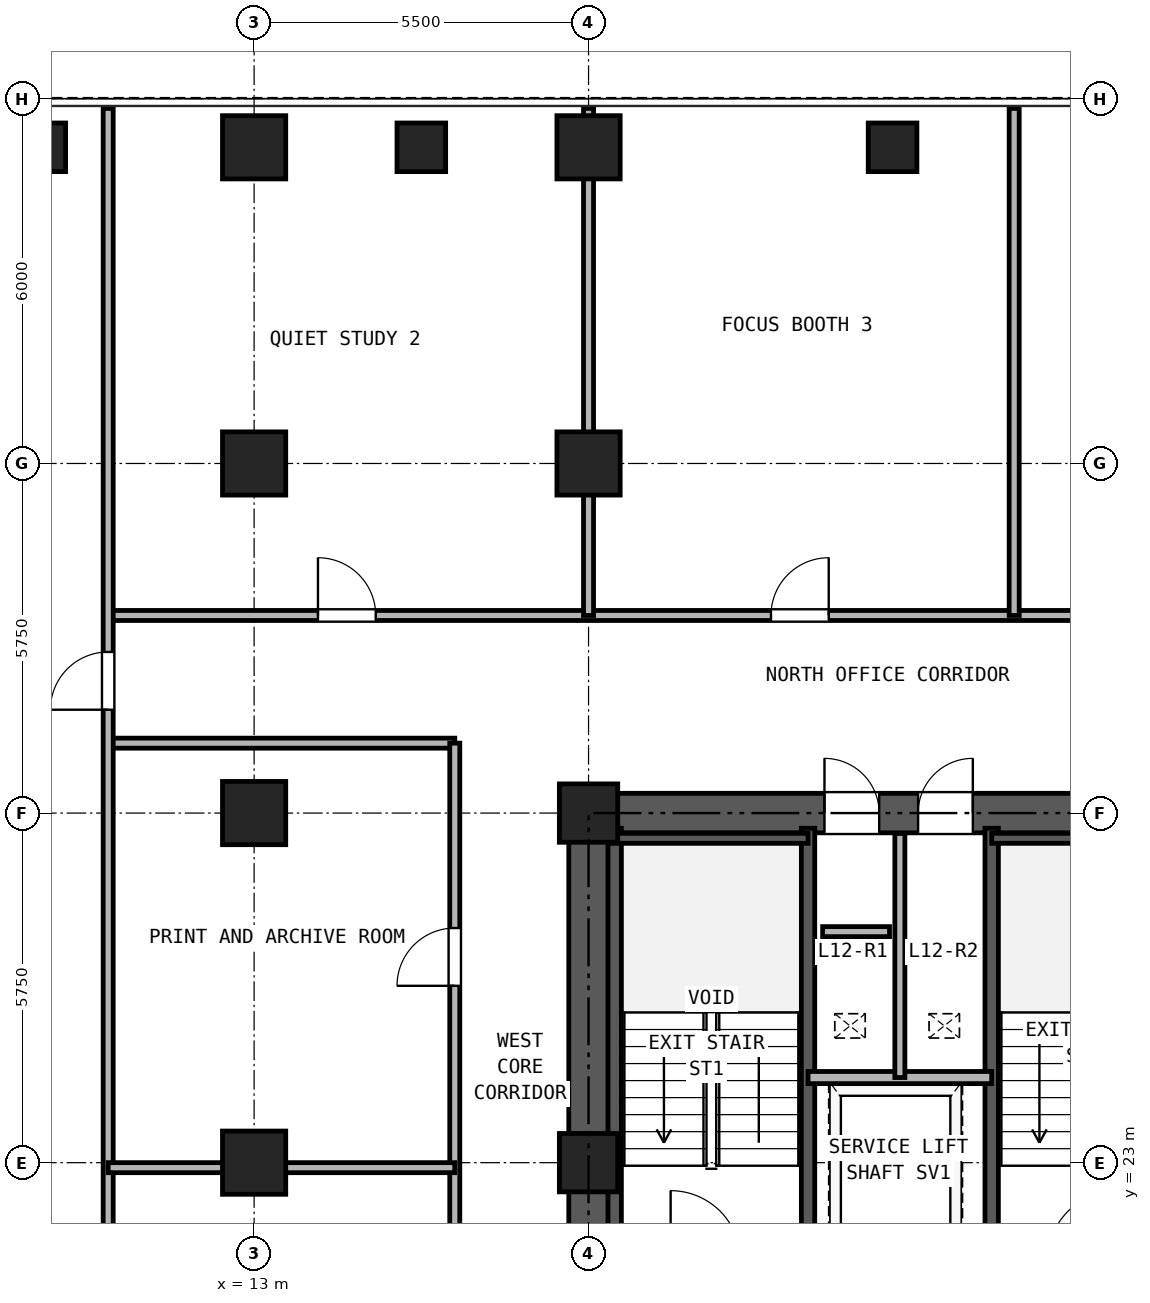
"""IFC4 building model, lengths in metres.
Left out: names, types, materials, properties, quantities, classifications, styles, units other than length and angle.
Written with IfcOpenShell. Run it as: python <this file> out.ifc"""

import sys

from ifc_helpers import new_model, si_unit, direction, frame, frame_2d, origin, origin_2d, place, context, subcontext, project, spatial, rectangle, hollow_rectangle, extrude, source, transform, mapped, element, fill, save


model = new_model("IFC4")
c1 = context("Model", 3, precision=1e-05, world=origin(), true_north=direction((0.0, 1.0)))
c2 = subcontext(c1, "Body", "Model", "MODEL_VIEW")
j1 = project(units=[si_unit("LENGTHUNIT", "METRE"), si_unit("PLANEANGLEUNIT", "RADIAN")], contexts=[c1])
p1 = place(None, origin())
s1 = spatial("IfcSite", under=j1, at=p1, CompositionType="ELEMENT")
p2 = place(p1, origin())
s2 = spatial("IfcBuilding", under=s1, at=p2, CompositionType="ELEMENT")
p3 = place(p2, frame((0.0, 0.0, 47.7)))
s3 = spatial("IfcBuildingStorey", under=s2, at=p3, CompositionType="ELEMENT", Elevation=47.7)
m1 = source(origin(), c2, "Body", "SweptSolid", [
    extrude(hollow_rectangle(XDim=1.04, YDim=1.04, WallThickness=0.065, at=origin_2d()), origin(), (0.0, 0.0, 1.0), 3.32),
])
for number, where, z_axis, x_axis in (
    (1, (13.0, 39.7, 0.0), (0.0, 0.0, 1.0), (1.0, 0.0, 0.0)),
    (2, (18.5, 39.7, 0.0), (0.0, 0.0, 1.0), (1.0, 0.0, 0.0)),
    (3, (13.0, 23.0, 0.0), (0.0, 0.0, 1.0), (1.0, 0.0, 0.0)),
    (4, (13.0, 28.75, 0.0), (0.0, 0.0, 1.0), (1.0, 0.0, 0.0)),
    (5, (13.0, 34.5, 0.0), (0.0, 0.0, 1.0), (1.0, 0.0, 0.0)),
):
    element("IfcColumn", number, at=place(p3, frame(where, z_axis=z_axis, x_axis=x_axis)), inside=s3, PredefinedType="COLUMN", context=c2, shape_type="MappedRepresentation", body=[
        mapped(m1, transform((0.0, 0.0, 0.0), x_axis=(1.0, 0.0, 0.0), y_axis=(0.0, 1.0, 0.0), z_axis=(0.0, 0.0, 1.0), scale=1.0)),
    ])
m2 = source(origin(), c2, "Body", "SweptSolid", [
    extrude(hollow_rectangle(XDim=0.96, YDim=0.96, WallThickness=0.06, at=origin_2d()), origin(), (0.0, 0.0, 1.0), 3.32),
])
for number, where, z_axis, x_axis in (
    (6, (18.5, 23.0, 0.0), (0.0, 0.0, 1.0), (1.0, 0.0, 0.0)),
    (7, (18.5, 28.75, 0.0), (0.0, 0.0, 1.0), (1.0, 0.0, 0.0)),
):
    element("IfcColumn", number, at=place(p3, frame(where, z_axis=z_axis, x_axis=x_axis)), inside=s3, PredefinedType="COLUMN", context=c2, shape_type="MappedRepresentation", body=[
        mapped(m2, transform((0.0, 0.0, 0.0), x_axis=(1.0, 0.0, 0.0), y_axis=(0.0, 1.0, 0.0), z_axis=(0.0, 0.0, 1.0), scale=1.0)),
    ])
p4 = place(p3, frame((18.5, 34.5, 0.0), z_axis=(0.0, 0.0, 1.0), x_axis=(1.0, 0.0, 0.0)))
e8 = element("IfcColumn", 8, at=p4, inside=s3, PredefinedType="COLUMN", context=c2, shape_type="MappedRepresentation", body=[
    mapped(m1, transform((0.0, 0.0, 0.0), x_axis=(1.0, 0.0, 0.0), y_axis=(0.0, 1.0, 0.0), z_axis=(0.0, 0.0, 1.0), scale=1.0)),
])
m3 = source(origin(), c2, "Body", "SweptSolid", [
    extrude(hollow_rectangle(XDim=0.8, YDim=0.8, WallThickness=0.045, at=origin_2d()), origin(), (0.0, 0.0, 1.0), 3.32),
])
for number, where, z_axis, x_axis in (
    (9, (9.5, 39.7, 0.0), (0.0, 0.0, 1.0), (1.0, 0.0, 0.0)),
    (10, (15.75, 39.7, 0.0), (0.0, 0.0, 1.0), (1.0, 0.0, 0.0)),
    (11, (23.5, 39.7, 0.0), (0.0, 0.0, 1.0), (1.0, 0.0, 0.0)),
):
    element("IfcColumn", number, at=place(p3, frame(where, z_axis=z_axis, x_axis=x_axis)), inside=s3, PredefinedType="COLUMN", context=c2, shape_type="MappedRepresentation", body=[
        mapped(m3, transform((0.0, 0.0, 0.0), x_axis=(1.0, 0.0, 0.0), y_axis=(0.0, 1.0, 0.0), z_axis=(0.0, 0.0, 1.0), scale=1.0)),
    ])
p5 = place(p3, frame((18.175, 28.75, 0.0), z_axis=(0.0, 0.0, 1.0), x_axis=(1.0, 0.0, 0.0)))
e12 = element("IfcWall", 12, at=p5, inside=s3, PredefinedType="SHEAR", context=c2, shape_type="SweptSolid", body=[
    extrude(rectangle(XDim=10.65, YDim=0.65, at=frame_2d((5.325, 0.0))), origin(), (0.0, 0.0, 1.0), 3.32),
])
p6 = place(p5, frame((4.205, 0.0, 0.0)))
e13 = element("IfcOpeningElement", 13, at=p6, cuts=e12, PredefinedType="OPENING", context=c2, shape_type="SweptSolid", body=[
    extrude(rectangle(XDim=0.9, YDim=2.05, at=frame_2d((0.45, 1.025))), frame((0.0, 0.335, 0.0), z_axis=(0.0, -1.0, 0.0), x_axis=(1.0, 0.0, 0.0)), (0.0, 0.0, 1.0), 0.67),
])
p7 = place(p5, frame((5.745, 0.0, 0.0)))
e14 = element("IfcOpeningElement", 14, at=p7, cuts=e12, PredefinedType="OPENING", context=c2, shape_type="SweptSolid", body=[
    extrude(rectangle(XDim=0.9, YDim=2.05, at=frame_2d((0.45, 1.025))), frame((0.0, 0.335, 0.0), z_axis=(0.0, -1.0, 0.0), x_axis=(1.0, 0.0, 0.0)), (0.0, 0.0, 1.0), 0.67),
])
p8 = place(p3, frame((18.5, 11.825, 0.0), z_axis=(0.0, 0.0, 1.0), x_axis=(0.0, 1.0, 0.0)))
e15 = element("IfcWall", 15, at=p8, inside=s3, PredefinedType="SHEAR", context=c2, shape_type="SweptSolid", body=[
    extrude(rectangle(XDim=16.6, YDim=0.65, at=frame_2d((8.3, 0.0))), origin(), (0.0, 0.0, 1.0), 3.32),
])
p9 = place(p8, frame((7.325, 0.0, 0.0)))
e16 = element("IfcOpeningElement", 16, at=p9, cuts=e15, PredefinedType="OPENING", context=c2, shape_type="SweptSolid", body=[
    extrude(rectangle(XDim=1.15, YDim=2.2, at=frame_2d((0.575, 1.1))), frame((0.0, 0.335, 0.0), z_axis=(0.0, -1.0, 0.0), x_axis=(1.0, 0.0, 0.0)), (0.0, 0.0, 1.0), 0.67),
])
for number, where, z_axis, x_axis in (
    (17, (18.93, 21.39, 0.0), (0.0, 0.0, 1.0), (0.0, 1.0, 0.0)),
    (18, (22.11, 21.39, 0.0), (0.0, 0.0, 1.0), (0.0, 1.0, 0.0)),
    (19, (25.13, 21.39, 0.0), (0.0, 0.0, 1.0), (0.0, 1.0, 0.0)),
):
    element("IfcWall", number, at=place(p3, frame(where, z_axis=z_axis, x_axis=x_axis)), inside=s3, PredefinedType="SOLIDWALL", context=c2, shape_type="SweptSolid", body=[
        extrude(rectangle(XDim=7.11, YDim=0.22, at=frame_2d((3.555, 0.0))), origin(), (0.0, 0.0, 1.0), 3.32),
    ])
p10 = place(p3, frame((18.835, 28.335, 0.0), z_axis=(0.0, 0.0, 1.0), x_axis=(1.0, 0.0, 0.0)))
e20 = element("IfcWall", 20, at=p10, inside=s3, PredefinedType="PARTITIONING", context=c2, shape_type="SweptSolid", body=[
    extrude(rectangle(XDim=3.275, YDim=0.165, at=frame_2d((1.638, 0.0))), origin(), (0.0, 0.0, 1.0), 3.32),
])
p11 = place(p3, frame((25.13, 28.335, 0.0), z_axis=(0.0, 0.0, 1.0), x_axis=(1.0, 0.0, 0.0)))
e21 = element("IfcWall", 21, at=p11, inside=s3, PredefinedType="PARTITIONING", context=c2, shape_type="SweptSolid", body=[
    extrude(rectangle(XDim=3.035, YDim=0.165, at=frame_2d((1.518, 0.0))), origin(), (0.0, 0.0, 1.0), 3.32),
])
p12 = place(p3, frame((22.11, 24.4, 0.0), z_axis=(0.0, 0.0, 1.0), x_axis=(1.0, 0.0, 0.0)))
e22 = element("IfcWall", 22, at=p12, inside=s3, PredefinedType="PARTITIONING", context=c2, shape_type="SweptSolid", body=[
    extrude(rectangle(XDim=3.02, YDim=0.2, at=frame_2d((1.51, 0.0))), origin(), (0.0, 0.0, 1.0), 3.32),
])
p13 = place(p3, frame((23.62, 24.4, 0.0), z_axis=(0.0, 0.0, 1.0), x_axis=(0.0, 1.0, 0.0)))
e23 = element("IfcWall", 23, at=p13, inside=s3, PredefinedType="PARTITIONING", context=c2, shape_type="SweptSolid", body=[
    extrude(rectangle(XDim=4.015, YDim=0.165, at=frame_2d((2.008, 0.0))), origin(), (0.0, 0.0, 1.0), 3.32),
])
p14 = place(p3, frame((10.6, 32.0, 0.0), z_axis=(0.0, 0.0, 1.0), x_axis=(1.0, 0.0, 0.0)))
e24 = element("IfcWall", 24, at=p14, inside=s3, PredefinedType="PARTITIONING", context=c2, shape_type="SweptSolid", body=[
    extrude(rectangle(XDim=25.8, YDim=0.165, at=frame_2d((12.9, 0.0))), origin(), (0.0, 0.0, 1.0), 3.32),
])
p15 = place(p14, frame((3.45, 0.0, 0.0)))
e25 = element("IfcOpeningElement", 25, at=p15, cuts=e24, PredefinedType="OPENING", context=c2, shape_type="SweptSolid", body=[
    extrude(rectangle(XDim=0.95, YDim=2.15, at=frame_2d((0.475, 1.075))), frame((0.0, 0.093, 0.0), z_axis=(0.0, -1.0, 0.0), x_axis=(1.0, 0.0, 0.0)), (0.0, 0.0, 1.0), 0.185),
])
p16 = place(p14, frame((10.9, 0.0, 0.0)))
e26 = element("IfcOpeningElement", 26, at=p16, cuts=e24, PredefinedType="OPENING", context=c2, shape_type="SweptSolid", body=[
    extrude(rectangle(XDim=0.95, YDim=2.15, at=frame_2d((0.475, 1.075))), frame((0.0, 0.093, 0.0), z_axis=(0.0, -1.0, 0.0), x_axis=(1.0, 0.0, 0.0)), (0.0, 0.0, 1.0), 0.185),
])
p17 = place(p14, frame((19.85, 0.0, 0.0)))
e27 = element("IfcOpeningElement", 27, at=p17, cuts=e24, PredefinedType="OPENING", context=c2, shape_type="SweptSolid", body=[
    extrude(rectangle(XDim=0.95, YDim=2.15, at=frame_2d((0.475, 1.075))), frame((0.0, 0.093, 0.0), z_axis=(0.0, -1.0, 0.0), x_axis=(1.0, 0.0, 0.0)), (0.0, 0.0, 1.0), 0.185),
])
p18 = place(p3, frame((10.6, 29.9, 0.0), z_axis=(0.0, 0.0, 1.0), x_axis=(1.0, 0.0, 0.0)))
e28 = element("IfcWall", 28, at=p18, inside=s3, PredefinedType="PARTITIONING", context=c2, shape_type="SweptSolid", body=[
    extrude(rectangle(XDim=5.7, YDim=0.165, at=frame_2d((2.85, 0.0))), origin(), (0.0, 0.0, 1.0), 3.32),
])
p19 = place(p3, frame((16.3, 10.2, 0.0), z_axis=(0.0, 0.0, 1.0), x_axis=(0.0, 1.0, 0.0)))
e29 = element("IfcWall", 29, at=p19, inside=s3, PredefinedType="PARTITIONING", context=c2, shape_type="SweptSolid", body=[
    extrude(rectangle(XDim=19.7, YDim=0.165, at=frame_2d((9.85, 0.0))), origin(), (0.0, 0.0, 1.0), 3.32),
])
p20 = place(p19, frame((5.859, 0.0, 0.0)))
e30 = element("IfcOpeningElement", 30, at=p20, cuts=e29, PredefinedType="OPENING", context=c2, shape_type="SweptSolid", body=[
    extrude(rectangle(XDim=0.95, YDim=2.15, at=frame_2d((0.475, 1.075))), frame((0.0, 0.093, 0.0), z_axis=(0.0, -1.0, 0.0), x_axis=(1.0, 0.0, 0.0)), (0.0, 0.0, 1.0), 0.185),
])
p21 = place(p19, frame((15.709, 0.0, 0.0)))
e31 = element("IfcOpeningElement", 31, at=p21, cuts=e29, PredefinedType="OPENING", context=c2, shape_type="SweptSolid", body=[
    extrude(rectangle(XDim=0.95, YDim=2.15, at=frame_2d((0.475, 1.075))), frame((0.0, 0.093, 0.0), z_axis=(0.0, -1.0, 0.0), x_axis=(1.0, 0.0, 0.0)), (0.0, 0.0, 1.0), 0.185),
])
p22 = place(p3, frame((10.6, 0.16, 0.0), z_axis=(0.0, 0.0, 1.0), x_axis=(0.0, 1.0, 0.0)))
e32 = element("IfcWall", 32, at=p22, inside=s3, PredefinedType="PARTITIONING", context=c2, shape_type="SweptSolid", body=[
    extrude(rectangle(XDim=40.18, YDim=0.165, at=frame_2d((20.09, 0.0))), origin(), (0.0, 0.0, 1.0), 3.32),
])
p23 = place(p22, frame((8.49, 0.0, 0.0)))
e33 = element("IfcOpeningElement", 33, at=p23, cuts=e32, PredefinedType="OPENING", context=c2, shape_type="SweptSolid", body=[
    extrude(rectangle(XDim=0.95, YDim=2.15, at=frame_2d((0.475, 1.075))), frame((0.0, 0.093, 0.0), z_axis=(0.0, -1.0, 0.0), x_axis=(1.0, 0.0, 0.0)), (0.0, 0.0, 1.0), 0.185),
])
p24 = place(p22, frame((30.29, 0.0, 0.0)))
e34 = element("IfcOpeningElement", 34, at=p24, cuts=e32, PredefinedType="OPENING", context=c2, shape_type="SweptSolid", body=[
    extrude(rectangle(XDim=0.95, YDim=2.15, at=frame_2d((0.475, 1.075))), frame((0.0, 0.093, 0.0), z_axis=(0.0, -1.0, 0.0), x_axis=(1.0, 0.0, 0.0)), (0.0, 0.0, 1.0), 0.185),
])
p25 = place(p3, frame((18.5, 32.0, 0.0), z_axis=(0.0, 0.0, 1.0), x_axis=(0.0, 1.0, 0.0)))
e35 = element("IfcWall", 35, at=p25, inside=s3, PredefinedType="PARTITIONING", context=c2, shape_type="SweptSolid", body=[
    extrude(rectangle(XDim=8.34, YDim=0.165, at=frame_2d((4.17, 0.0))), origin(), (0.0, 0.0, 1.0), 2.539),
])
p26 = place(p3, frame((25.5, 32.0, 0.0), z_axis=(0.0, 0.0, 1.0), x_axis=(0.0, 1.0, 0.0)))
e36 = element("IfcWall", 36, at=p26, inside=s3, PredefinedType="PARTITIONING", context=c2, shape_type="SweptSolid", body=[
    extrude(rectangle(XDim=8.34, YDim=0.165, at=frame_2d((4.17, 0.0))), origin(), (0.0, 0.0, 1.0), 3.32),
])
p27 = place(p3, frame((10.6, 22.918, 0.0), z_axis=(0.0, 0.0, 1.0), x_axis=(1.0, 0.0, 0.0)))
e37 = element("IfcWall", 37, at=p27, inside=s3, PredefinedType="PARTITIONING", context=c2, shape_type="SweptSolid", body=[
    extrude(rectangle(XDim=5.7, YDim=0.165, at=frame_2d((2.85, 0.0))), origin(), (0.0, 0.0, 1.0), 2.539),
])
p28 = place(p3, frame((22.35, 26.8, 0.0), z_axis=(0.0, 0.0, 1.0), x_axis=(1.0, 0.0, 0.0)))
e38 = element("IfcWall", 38, at=p28, inside=s3, PredefinedType="PARTITIONING", context=c2, shape_type="SweptSolid", body=[
    extrude(rectangle(XDim=1.1, YDim=0.165, at=frame_2d((0.55, 0.0))), origin(), (0.0, 0.0, 1.0), 3.32),
])
p29 = place(p6, origin())
e39 = element("IfcDoor", 39, at=p29, inside=s3, OperationType="SINGLE_SWING_LEFT", PredefinedType="DOOR", context=c2, shape_type="SweptSolid", body=[
    extrude(rectangle(XDim=0.9, YDim=2.05, at=frame_2d((0.45, 1.025))), frame((0.0, 0.025, 0.0), z_axis=(0.0, -1.0, 0.0), x_axis=(1.0, 0.0, 0.0)), (0.0, 0.0, 1.0), 0.05),
])
fill(e13, e39)
p30 = place(p7, origin())
e40 = element("IfcDoor", 40, at=p30, inside=s3, OperationType="SINGLE_SWING_RIGHT", PredefinedType="DOOR", context=c2, shape_type="SweptSolid", body=[
    extrude(rectangle(XDim=0.9, YDim=2.05, at=frame_2d((0.45, 1.025))), frame((0.0, 0.025, 0.0), z_axis=(0.0, -1.0, 0.0), x_axis=(1.0, 0.0, 0.0)), (0.0, 0.0, 1.0), 0.05),
])
fill(e14, e40)
p31 = place(p15, origin())
e41 = element("IfcDoor", 41, at=p31, inside=s3, OperationType="SINGLE_SWING_LEFT", PredefinedType="DOOR", context=c2, shape_type="SweptSolid", body=[
    extrude(rectangle(XDim=0.95, YDim=2.15, at=frame_2d((0.475, 1.075))), frame((0.0, 0.025, 0.0), z_axis=(0.0, -1.0, 0.0), x_axis=(1.0, 0.0, 0.0)), (0.0, 0.0, 1.0), 0.05),
])
fill(e25, e41)
p32 = place(p16, origin())
e42 = element("IfcDoor", 42, at=p32, inside=s3, OperationType="SINGLE_SWING_RIGHT", PredefinedType="DOOR", context=c2, shape_type="SweptSolid", body=[
    extrude(rectangle(XDim=0.95, YDim=2.15, at=frame_2d((0.475, 1.075))), frame((0.0, 0.025, 0.0), z_axis=(0.0, -1.0, 0.0), x_axis=(1.0, 0.0, 0.0)), (0.0, 0.0, 1.0), 0.05),
])
fill(e26, e42)
p33 = place(p24, frame((0.95, 0.0, 0.0), z_axis=(0.0, 0.0, 1.0), x_axis=(-1.0, 0.0, 0.0)))
e43 = element("IfcDoor", 43, at=p33, inside=s3, OperationType="SINGLE_SWING_LEFT", PredefinedType="DOOR", context=c2, shape_type="SweptSolid", body=[
    extrude(rectangle(XDim=0.95, YDim=2.15, at=frame_2d((0.475, 1.075))), frame((0.0, 0.025, 0.0), z_axis=(0.0, -1.0, 0.0), x_axis=(1.0, 0.0, 0.0)), (0.0, 0.0, 1.0), 0.05),
])
fill(e34, e43)
p34 = place(p21, frame((0.95, 0.0, 0.0), z_axis=(0.0, 0.0, 1.0), x_axis=(-1.0, 0.0, 0.0)))
e44 = element("IfcDoor", 44, at=p34, inside=s3, OperationType="SINGLE_SWING_LEFT", PredefinedType="DOOR", context=c2, shape_type="SweptSolid", body=[
    extrude(rectangle(XDim=0.95, YDim=2.15, at=frame_2d((0.475, 1.075))), frame((0.0, 0.025, 0.0), z_axis=(0.0, -1.0, 0.0), x_axis=(1.0, 0.0, 0.0)), (0.0, 0.0, 1.0), 0.05),
])
fill(e31, e44)
save(model, sys.argv[1])
